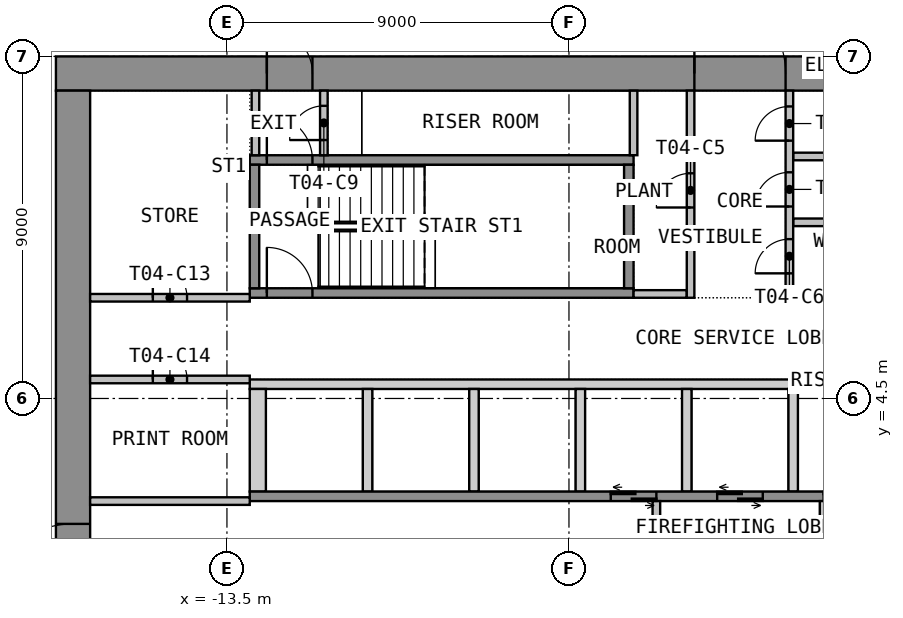
"""IFC4 building model, lengths in metres.
Left out: names, types, materials, properties, quantities, classifications, styles, units other than length and angle.
Written with IfcOpenShell. Run it as: python <this file> out.ifc"""

import sys

from ifc_helpers import new_model, si_unit, direction, frame, frame_2d, origin, place, context, subcontext, project, spatial, polyline, rectangle, outline, extrude, element, fill, save


model = new_model("IFC4")
c1 = context("Model", 3, precision=1e-05, world=origin(), true_north=direction((0.0, 1.0)))
c2 = subcontext(c1, "Body", "Model", "MODEL_VIEW")
j1 = project(units=[si_unit("LENGTHUNIT", "METRE"), si_unit("PLANEANGLEUNIT", "RADIAN")], contexts=[c1])
p1 = place(None, origin())
s1 = spatial("IfcSite", under=j1, at=p1, CompositionType="ELEMENT")
p2 = place(p1, origin())
s2 = spatial("IfcBuilding", under=s1, at=p2, CompositionType="ELEMENT")
p3 = place(p2, frame((0.0, 0.0, 65.1)))
s3 = spatial("IfcBuildingStorey", under=s2, at=p3, CompositionType="ELEMENT", Elevation=65.1)
p4 = place(p3, frame((-18.0, 13.05, 0.0), z_axis=(0.0, 0.0, 1.0), x_axis=(1.0, 0.0, 0.0)))
e1 = element("IfcWall", 1, at=p4, inside=s3, PredefinedType="SHEAR", context=c2, shape_type="SweptSolid", body=[
    extrude(rectangle(XDim=36.0, YDim=0.9, at=frame_2d((18.0, 0.0))), origin(), (0.0, 0.0, 1.0), 3.525),
])
p5 = place(p4, frame((16.8, 0.0, 0.0)))
e2 = element("IfcOpeningElement", 2, at=p5, cuts=e1, PredefinedType="OPENING", context=c2, shape_type="SweptSolid", body=[
    extrude(rectangle(XDim=2.4, YDim=2.1, at=frame_2d((1.2, 1.05))), frame((0.0, 0.46, 0.0), z_axis=(0.0, -1.0, 0.0), x_axis=(1.0, 0.0, 0.0)), (0.0, 0.0, 1.0), 0.92),
])
p6 = place(p4, frame((5.55, 0.0, 0.0)))
e3 = element("IfcOpeningElement", 3, at=p6, cuts=e1, PredefinedType="OPENING", context=c2, shape_type="SweptSolid", body=[
    extrude(rectangle(XDim=1.2, YDim=2.1, at=frame_2d((0.6, 1.05))), frame((0.0, 0.46, 0.0), z_axis=(0.0, -1.0, 0.0), x_axis=(1.0, 0.0, 0.0)), (0.0, 0.0, 1.0), 0.92),
])
p7 = place(p4, frame((29.25, 0.0, 0.0)))
e4 = element("IfcOpeningElement", 4, at=p7, cuts=e1, PredefinedType="OPENING", context=c2, shape_type="SweptSolid", body=[
    extrude(rectangle(XDim=1.2, YDim=2.1, at=frame_2d((0.6, 1.05))), frame((0.0, 0.46, 0.0), z_axis=(0.0, -1.0, 0.0), x_axis=(1.0, 0.0, 0.0)), (0.0, 0.0, 1.0), 0.92),
])
p8 = place(p3, frame((-17.55, -12.6, 0.0), z_axis=(0.0, 0.0, 1.0), x_axis=(0.0, 1.0, 0.0)))
e5 = element("IfcWall", 5, at=p8, inside=s3, PredefinedType="SHEAR", context=c2, shape_type="SweptSolid", body=[
    extrude(rectangle(XDim=25.2, YDim=0.9, at=frame_2d((12.6, 0.0))), origin(), (0.0, 0.0, 1.0), 3.525),
])
p9 = place(p8, frame((11.4, 0.0, 0.0)))
e6 = element("IfcOpeningElement", 6, at=p9, cuts=e5, PredefinedType="OPENING", context=c2, shape_type="SweptSolid", body=[
    extrude(rectangle(XDim=2.4, YDim=2.1, at=frame_2d((1.2, 1.05))), frame((0.0, 0.46, 0.0), z_axis=(0.0, -1.0, 0.0), x_axis=(1.0, 0.0, 0.0)), (0.0, 0.0, 1.0), 0.92),
])
p10 = place(p3, origin())
e7 = element("IfcWall", 7, at=p10, inside=s3, PredefinedType="SHEAR", context=c2, shape_type="SweptSolid", body=[
    extrude(outline(polyline([(-12.9, 4.75), (12.9, 4.75), (12.9, 5.0), (-12.9, 5.0), (-12.9, 4.75)])), origin(), (0.0, 0.0, 1.0), 3.525),
])
p11 = place(p3, origin())
e8 = element("IfcWall", 8, at=p11, inside=s3, PredefinedType="SHEAR", context=c2, shape_type="SweptSolid", body=[
    extrude(outline(polyline([(-12.9, 2.05), (-12.475, 2.05), (-12.475, 4.75), (-12.9, 4.75), (-12.9, 2.05)])), origin(), (0.0, 0.0, 1.0), 3.525),
])
p12 = place(p3, origin())
e9 = element("IfcWall", 9, at=p12, inside=s3, PredefinedType="SHEAR", context=c2, shape_type="SweptSolid", body=[
    extrude(outline(polyline([(-9.925, 2.05), (-9.675, 2.05), (-9.675, 4.75), (-9.925, 4.75), (-9.925, 2.05)])), origin(), (0.0, 0.0, 1.0), 3.525),
])
p13 = place(p3, origin())
e10 = element("IfcWall", 10, at=p13, inside=s3, PredefinedType="SHEAR", context=c2, shape_type="SweptSolid", body=[
    extrude(outline(polyline([(-7.125, 2.05), (-6.875, 2.05), (-6.875, 4.75), (-7.125, 4.75), (-7.125, 2.05)])), origin(), (0.0, 0.0, 1.0), 3.525),
])
p14 = place(p3, origin())
e11 = element("IfcWall", 11, at=p14, inside=s3, PredefinedType="SHEAR", context=c2, shape_type="SweptSolid", body=[
    extrude(outline(polyline([(-4.325, 2.05), (-4.075, 2.05), (-4.075, 4.75), (-4.325, 4.75), (-4.325, 2.05)])), origin(), (0.0, 0.0, 1.0), 3.525),
])
p15 = place(p3, origin())
e12 = element("IfcWall", 12, at=p15, inside=s3, PredefinedType="SHEAR", context=c2, shape_type="SweptSolid", body=[
    extrude(outline(polyline([(-1.525, 2.05), (-1.275, 2.05), (-1.275, 4.75), (-1.525, 4.75), (-1.525, 2.05)])), origin(), (0.0, 0.0, 1.0), 3.525),
])
p16 = place(p3, origin())
e13 = element("IfcWall", 13, at=p16, inside=s3, PredefinedType="SHEAR", context=c2, shape_type="SweptSolid", body=[
    extrude(outline(polyline([(1.275, 2.05), (1.525, 2.05), (1.525, 4.75), (1.275, 4.75), (1.275, 2.05)])), origin(), (0.0, 0.0, 1.0), 3.525),
])
p17 = place(p3, frame((-12.9, 1.925, 0.0), z_axis=(0.0, 0.0, 1.0), x_axis=(1.0, 0.0, 0.0)))
e14 = element("IfcWall", 14, at=p17, inside=s3, PredefinedType="SHEAR", context=c2, shape_type="SweptSolid", body=[
    extrude(rectangle(XDim=25.8, YDim=0.25, at=frame_2d((12.9, 0.0))), origin(), (0.0, 0.0, 1.0), 3.525),
])
p18 = place(p17, frame((9.5, 0.0, 0.0)))
e15 = element("IfcOpeningElement", 15, at=p18, cuts=e14, PredefinedType="OPENING", context=c2, shape_type="SweptSolid", body=[
    extrude(rectangle(XDim=1.2, YDim=2.1, at=frame_2d((0.6, 1.05))), frame((0.0, 0.135, 0.0), z_axis=(0.0, -1.0, 0.0), x_axis=(1.0, 0.0, 0.0)), (0.0, 0.0, 1.0), 0.27),
])
p19 = place(p17, frame((12.3, 0.0, 0.0)))
e16 = element("IfcOpeningElement", 16, at=p19, cuts=e14, PredefinedType="OPENING", context=c2, shape_type="SweptSolid", body=[
    extrude(rectangle(XDim=1.2, YDim=2.1, at=frame_2d((0.6, 1.05))), frame((0.0, 0.135, 0.0), z_axis=(0.0, -1.0, 0.0), x_axis=(1.0, 0.0, 0.0)), (0.0, 0.0, 1.0), 0.27),
])
p20 = place(p17, frame((15.1, 0.0, 0.0)))
e17 = element("IfcOpeningElement", 17, at=p20, cuts=e14, PredefinedType="OPENING", context=c2, shape_type="SweptSolid", body=[
    extrude(rectangle(XDim=1.2, YDim=2.1, at=frame_2d((0.6, 1.05))), frame((0.0, 0.135, 0.0), z_axis=(0.0, -1.0, 0.0), x_axis=(1.0, 0.0, 0.0)), (0.0, 0.0, 1.0), 0.27),
])
p21 = place(p17, frame((17.9, 0.0, 0.0)))
e18 = element("IfcOpeningElement", 18, at=p21, cuts=e14, PredefinedType="OPENING", context=c2, shape_type="SweptSolid", body=[
    extrude(rectangle(XDim=1.2, YDim=2.1, at=frame_2d((0.6, 1.05))), frame((0.0, 0.135, 0.0), z_axis=(0.0, -1.0, 0.0), x_axis=(1.0, 0.0, 0.0)), (0.0, 0.0, 1.0), 0.27),
])
p22 = place(p17, frame((20.7, 0.0, 0.0)))
e19 = element("IfcOpeningElement", 19, at=p22, cuts=e14, PredefinedType="OPENING", context=c2, shape_type="SweptSolid", body=[
    extrude(rectangle(XDim=1.2, YDim=2.1, at=frame_2d((0.6, 1.05))), frame((0.0, 0.135, 0.0), z_axis=(0.0, -1.0, 0.0), x_axis=(1.0, 0.0, 0.0)), (0.0, 0.0, 1.0), 0.27),
])
p23 = place(p17, frame((23.5, 0.0, 0.0)))
e20 = element("IfcOpeningElement", 20, at=p23, cuts=e14, PredefinedType="OPENING", context=c2, shape_type="SweptSolid", body=[
    extrude(rectangle(XDim=1.2, YDim=2.1, at=frame_2d((0.6, 1.05))), frame((0.0, 0.135, 0.0), z_axis=(0.0, -1.0, 0.0), x_axis=(1.0, 0.0, 0.0)), (0.0, 0.0, 1.0), 0.27),
])
p24 = place(p3, frame((-2.2, -1.8, 0.0), z_axis=(0.0, 0.0, 1.0), x_axis=(0.0, 1.0, 0.0)))
e21 = element("IfcWall", 21, at=p24, inside=s3, PredefinedType="PARTITIONING", context=c2, shape_type="SweptSolid", body=[
    extrude(rectangle(XDim=3.6, YDim=0.2, at=frame_2d((1.8, 0.0))), origin(), (0.0, 0.0, 1.0), 3.525),
])
p25 = place(p24, frame((1.2, 0.0, 0.0)))
e22 = element("IfcOpeningElement", 22, at=p25, cuts=e21, PredefinedType="OPENING", context=c2, shape_type="SweptSolid", body=[
    extrude(rectangle(XDim=1.2, YDim=2.1, at=frame_2d((0.6, 1.05))), frame((0.0, 0.11, 0.0), z_axis=(0.0, -1.0, 0.0), x_axis=(1.0, 0.0, 0.0)), (0.0, 0.0, 1.0), 0.22),
])
p26 = place(p3, frame((2.2, -1.8, 0.0), z_axis=(0.0, 0.0, 1.0), x_axis=(0.0, 1.0, 0.0)))
e23 = element("IfcWall", 23, at=p26, inside=s3, PredefinedType="PARTITIONING", context=c2, shape_type="SweptSolid", body=[
    extrude(rectangle(XDim=3.6, YDim=0.2, at=frame_2d((1.8, 0.0))), origin(), (0.0, 0.0, 1.0), 3.525),
])
p27 = place(p26, frame((1.2, 0.0, 0.0)))
e24 = element("IfcOpeningElement", 24, at=p27, cuts=e23, PredefinedType="OPENING", context=c2, shape_type="SweptSolid", body=[
    extrude(rectangle(XDim=1.2, YDim=2.1, at=frame_2d((0.6, 1.05))), frame((0.0, 0.11, 0.0), z_axis=(0.0, -1.0, 0.0), x_axis=(1.0, 0.0, 0.0)), (0.0, 0.0, 1.0), 0.22),
])
p28 = place(p3, frame((-12.9, 7.275, 0.0), z_axis=(0.0, 0.0, 1.0), x_axis=(1.0, 0.0, 0.0)))
e25 = element("IfcWall", 25, at=p28, inside=s3, PredefinedType="SHEAR", context=c2, shape_type="SweptSolid", body=[
    extrude(rectangle(XDim=10.1, YDim=0.25, at=frame_2d((5.05, 0.0))), origin(), (0.0, 0.0, 1.0), 3.525),
])
p29 = place(p28, frame((0.45, 0.0, 0.0)))
e26 = element("IfcOpeningElement", 26, at=p29, cuts=e25, PredefinedType="OPENING", context=c2, shape_type="SweptSolid", body=[
    extrude(rectangle(XDim=1.2, YDim=2.1, at=frame_2d((0.6, 1.05))), frame((0.0, 0.135, 0.0), z_axis=(0.0, -1.0, 0.0), x_axis=(1.0, 0.0, 0.0)), (0.0, 0.0, 1.0), 0.27),
])
p30 = place(p3, frame((-12.9, 10.775, 0.0), z_axis=(0.0, 0.0, 1.0), x_axis=(1.0, 0.0, 0.0)))
e27 = element("IfcWall", 27, at=p30, inside=s3, PredefinedType="SHEAR", context=c2, shape_type="SweptSolid", body=[
    extrude(rectangle(XDim=10.1, YDim=0.25, at=frame_2d((5.05, 0.0))), origin(), (0.0, 0.0, 1.0), 3.525),
])
p31 = place(p30, frame((0.45, 0.0, 0.0)))
e28 = element("IfcOpeningElement", 28, at=p31, cuts=e27, PredefinedType="OPENING", context=c2, shape_type="SweptSolid", body=[
    extrude(rectangle(XDim=1.2, YDim=2.1, at=frame_2d((0.6, 1.05))), frame((0.0, 0.135, 0.0), z_axis=(0.0, -1.0, 0.0), x_axis=(1.0, 0.0, 0.0)), (0.0, 0.0, 1.0), 0.27),
])
for number, where, z_axis, x_axis in (
    (29, (-12.775, 7.4, 0.0), (0.0, 0.0, 1.0), (0.0, 1.0, 0.0)),
    (30, (-2.925, 7.4, 0.0), (0.0, 0.0, 1.0), (0.0, 1.0, 0.0)),
):
    element("IfcWall", number, at=place(p3, frame(where, z_axis=z_axis, x_axis=x_axis)), inside=s3, PredefinedType="SHEAR", context=c2, shape_type="SweptSolid", body=[
        extrude(rectangle(XDim=3.25, YDim=0.25, at=frame_2d((1.625, 0.0))), origin(), (0.0, 0.0, 1.0), 3.525),
    ])
for number, where, z_axis, x_axis in (
    (31, (-2.8, 7.25, 0.0), (0.0, 0.0, 1.0), (1.0, 0.0, 0.0)),
    (32, (1.4, 7.25, 0.0), (0.0, 0.0, 1.0), (1.0, 0.0, 0.0)),
    (33, (1.4, 9.135, 0.0), (0.0, 0.0, 1.0), (1.0, 0.0, 0.0)),
    (34, (1.4, 10.867, 0.0), (0.0, 0.0, 1.0), (1.0, 0.0, 0.0)),
):
    element("IfcWall", number, at=place(p3, frame(where, z_axis=z_axis, x_axis=x_axis)), inside=s3, PredefinedType="PARTITIONING", context=c2, shape_type="SweptSolid", body=[
        extrude(rectangle(XDim=1.4, YDim=0.2, at=frame_2d((0.7, 0.0))), origin(), (0.0, 0.0, 1.0), 3.525),
    ])
p32 = place(p3, frame((-1.3, 7.15, 0.0), z_axis=(0.0, 0.0, 1.0), x_axis=(0.0, 1.0, 0.0)))
e35 = element("IfcWall", 35, at=p32, inside=s3, PredefinedType="PARTITIONING", context=c2, shape_type="SweptSolid", body=[
    extrude(rectangle(XDim=5.45, YDim=0.2, at=frame_2d((2.725, 0.0))), origin(), (0.0, 0.0, 1.0), 3.525),
])
p33 = place(p32, frame((2.375, 0.0, 0.0)))
e36 = element("IfcOpeningElement", 36, at=p33, cuts=e35, PredefinedType="OPENING", context=c2, shape_type="SweptSolid", body=[
    extrude(rectangle(XDim=0.9, YDim=2.1, at=frame_2d((0.45, 1.05))), frame((0.0, 0.11, 0.0), z_axis=(0.0, -1.0, 0.0), x_axis=(1.0, 0.0, 0.0)), (0.0, 0.0, 1.0), 0.22),
])
p34 = place(p3, frame((1.3, 7.15, 0.0), z_axis=(0.0, 0.0, 1.0), x_axis=(0.0, 1.0, 0.0)))
e37 = element("IfcWall", 37, at=p34, inside=s3, PredefinedType="PARTITIONING", context=c2, shape_type="SweptSolid", body=[
    extrude(rectangle(XDim=5.45, YDim=0.2, at=frame_2d((2.725, 0.0))), origin(), (0.0, 0.0, 1.0), 3.525),
])
p35 = place(p34, frame((0.643, 0.0, 0.0)))
e38 = element("IfcOpeningElement", 38, at=p35, cuts=e37, PredefinedType="OPENING", context=c2, shape_type="SweptSolid", body=[
    extrude(rectangle(XDim=0.9, YDim=2.1, at=frame_2d((0.45, 1.05))), frame((0.0, 0.11, 0.0), z_axis=(0.0, -1.0, 0.0), x_axis=(1.0, 0.0, 0.0)), (0.0, 0.0, 1.0), 0.22),
])
p36 = place(p34, frame((2.401, 0.0, 0.0)))
e39 = element("IfcOpeningElement", 39, at=p36, cuts=e37, PredefinedType="OPENING", context=c2, shape_type="SweptSolid", body=[
    extrude(rectangle(XDim=0.9, YDim=2.1, at=frame_2d((0.45, 1.05))), frame((0.0, 0.11, 0.0), z_axis=(0.0, -1.0, 0.0), x_axis=(1.0, 0.0, 0.0)), (0.0, 0.0, 1.0), 0.22),
])
p37 = place(p34, frame((4.134, 0.0, 0.0)))
e40 = element("IfcOpeningElement", 40, at=p37, cuts=e37, PredefinedType="OPENING", context=c2, shape_type="SweptSolid", body=[
    extrude(rectangle(XDim=0.9, YDim=2.1, at=frame_2d((0.45, 1.05))), frame((0.0, 0.11, 0.0), z_axis=(0.0, -1.0, 0.0), x_axis=(1.0, 0.0, 0.0)), (0.0, 0.0, 1.0), 0.22),
])
p38 = place(p3, frame((-12.75, 10.9, 0.0), z_axis=(0.0, 0.0, 1.0), x_axis=(0.0, 1.0, 0.0)))
e41 = element("IfcWall", 41, at=p38, inside=s3, PredefinedType="PARTITIONING", context=c2, shape_type="SweptSolid", body=[
    extrude(rectangle(XDim=1.7, YDim=0.2, at=frame_2d((0.85, 0.0))), origin(), (0.0, 0.0, 1.0), 3.525),
])
p39 = place(p3, frame((-10.95, 10.9, 0.0), z_axis=(0.0, 0.0, 1.0), x_axis=(0.0, 1.0, 0.0)))
e42 = element("IfcWall", 42, at=p39, inside=s3, PredefinedType="PARTITIONING", context=c2, shape_type="SweptSolid", body=[
    extrude(rectangle(XDim=1.7, YDim=0.2, at=frame_2d((0.85, 0.0))), origin(), (0.0, 0.0, 1.0), 3.525),
])
p40 = place(p39, frame((0.4, 0.0, 0.0)))
e43 = element("IfcOpeningElement", 43, at=p40, cuts=e42, PredefinedType="OPENING", context=c2, shape_type="SweptSolid", body=[
    extrude(rectangle(XDim=0.9, YDim=2.1, at=frame_2d((0.45, 1.05))), frame((0.0, 0.11, 0.0), z_axis=(0.0, -1.0, 0.0), x_axis=(1.0, 0.0, 0.0)), (0.0, 0.0, 1.0), 0.22),
])
p41 = place(p3, frame((-17.1, 7.15, 0.0), z_axis=(0.0, 0.0, 1.0), x_axis=(1.0, 0.0, 0.0)))
e44 = element("IfcWall", 44, at=p41, inside=s3, PredefinedType="PARTITIONING", context=c2, shape_type="SweptSolid", body=[
    extrude(rectangle(XDim=4.2, YDim=0.2, at=frame_2d((2.1, 0.0))), origin(), (0.0, 0.0, 1.0), 3.525),
])
p42 = place(p41, frame((1.65, 0.0, 0.0)))
e45 = element("IfcOpeningElement", 45, at=p42, cuts=e44, PredefinedType="OPENING", context=c2, shape_type="SweptSolid", body=[
    extrude(rectangle(XDim=0.9, YDim=2.1, at=frame_2d((0.45, 1.05))), frame((0.0, 0.11, 0.0), z_axis=(0.0, -1.0, 0.0), x_axis=(1.0, 0.0, 0.0)), (0.0, 0.0, 1.0), 0.22),
])
p43 = place(p3, frame((-17.1, 5.0, 0.0), z_axis=(0.0, 0.0, 1.0), x_axis=(1.0, 0.0, 0.0)))
e46 = element("IfcWall", 46, at=p43, inside=s3, PredefinedType="PARTITIONING", context=c2, shape_type="SweptSolid", body=[
    extrude(rectangle(XDim=4.2, YDim=0.2, at=frame_2d((2.1, 0.0))), origin(), (0.0, 0.0, 1.0), 3.525),
])
p44 = place(p43, frame((1.65, 0.0, 0.0)))
e47 = element("IfcOpeningElement", 47, at=p44, cuts=e46, PredefinedType="OPENING", context=c2, shape_type="SweptSolid", body=[
    extrude(rectangle(XDim=0.9, YDim=2.1, at=frame_2d((0.45, 1.05))), frame((0.0, 0.11, 0.0), z_axis=(0.0, -1.0, 0.0), x_axis=(1.0, 0.0, 0.0)), (0.0, 0.0, 1.0), 0.22),
])
p45 = place(p3, frame((-17.1, 1.8, 0.0), z_axis=(0.0, 0.0, 1.0), x_axis=(1.0, 0.0, 0.0)))
e48 = element("IfcWall", 48, at=p45, inside=s3, PredefinedType="PARTITIONING", context=c2, shape_type="SweptSolid", body=[
    extrude(rectangle(XDim=4.2, YDim=0.2, at=frame_2d((2.1, 0.0))), origin(), (0.0, 0.0, 1.0), 3.525),
])
p46 = place(p3, frame((-2.8, 10.901, 0.0), z_axis=(0.0, 0.0, 1.0), x_axis=(0.0, 1.0, 0.0)))
e49 = element("IfcWall", 49, at=p46, inside=s3, PredefinedType="PARTITIONING", context=c2, shape_type="SweptSolid", body=[
    extrude(rectangle(XDim=1.698, YDim=0.2, at=frame_2d((0.849, 0.0))), origin(), (0.0, 0.0, 1.0), 3.525),
])
p47 = place(p9, origin())
e50 = element("IfcDoor", 50, at=p47, inside=s3, OperationType="DOUBLE_DOOR_DOUBLE_SWING", PredefinedType="DOOR", context=c2, shape_type="SweptSolid", body=[
    extrude(rectangle(XDim=2.4, YDim=2.1, at=frame_2d((1.2, 1.05))), frame((0.0, 0.025, 0.0), z_axis=(0.0, -1.0, 0.0), x_axis=(1.0, 0.0, 0.0)), (0.0, 0.0, 1.0), 0.05),
])
fill(e6, e50)
p48 = place(p5, origin())
e51 = element("IfcDoor", 51, at=p48, inside=s3, OperationType="DOUBLE_DOOR_DOUBLE_SWING", PredefinedType="DOOR", context=c2, shape_type="SweptSolid", body=[
    extrude(rectangle(XDim=2.4, YDim=2.1, at=frame_2d((1.2, 1.05))), frame((0.0, 0.025, 0.0), z_axis=(0.0, -1.0, 0.0), x_axis=(1.0, 0.0, 0.0)), (0.0, 0.0, 1.0), 0.05),
])
fill(e2, e51)
p49 = place(p6, origin())
e52 = element("IfcDoor", 52, at=p49, inside=s3, OperationType="SINGLE_SWING_RIGHT", PredefinedType="DOOR", context=c2, shape_type="SweptSolid", body=[
    extrude(rectangle(XDim=1.2, YDim=2.1, at=frame_2d((0.6, 1.05))), frame((0.0, 0.025, 0.0), z_axis=(0.0, -1.0, 0.0), x_axis=(1.0, 0.0, 0.0)), (0.0, 0.0, 1.0), 0.05),
])
fill(e3, e52)
p50 = place(p18, origin())
e53 = element("IfcDoor", 53, at=p50, inside=s3, OperationType="DOUBLE_DOOR_SLIDING", PredefinedType="DOOR", context=c2, shape_type="SweptSolid", body=[
    extrude(rectangle(XDim=1.2, YDim=2.1, at=frame_2d((0.6, 1.05))), frame((0.0, 0.025, 0.0), z_axis=(0.0, -1.0, 0.0), x_axis=(1.0, 0.0, 0.0)), (0.0, 0.0, 1.0), 0.05),
])
fill(e15, e53)
p51 = place(p19, origin())
e54 = element("IfcDoor", 54, at=p51, inside=s3, OperationType="DOUBLE_DOOR_SLIDING", PredefinedType="DOOR", context=c2, shape_type="SweptSolid", body=[
    extrude(rectangle(XDim=1.2, YDim=2.1, at=frame_2d((0.6, 1.05))), frame((0.0, 0.025, 0.0), z_axis=(0.0, -1.0, 0.0), x_axis=(1.0, 0.0, 0.0)), (0.0, 0.0, 1.0), 0.05),
])
fill(e16, e54)
p52 = place(p29, origin())
e55 = element("IfcDoor", 55, at=p52, inside=s3, OperationType="SINGLE_SWING_LEFT", PredefinedType="DOOR", context=c2, shape_type="SweptSolid", body=[
    extrude(rectangle(XDim=1.2, YDim=2.1, at=frame_2d((0.6, 1.05))), frame((0.0, 0.025, 0.0), z_axis=(0.0, -1.0, 0.0), x_axis=(1.0, 0.0, 0.0)), (0.0, 0.0, 1.0), 0.05),
])
fill(e26, e55)
p53 = place(p33, origin())
e56 = element("IfcDoor", 56, at=p53, inside=s3, OperationType="SINGLE_SWING_LEFT", PredefinedType="DOOR", context=c2, shape_type="SweptSolid", body=[
    extrude(rectangle(XDim=0.9, YDim=2.1, at=frame_2d((0.45, 1.05))), frame((0.0, 0.025, 0.0), z_axis=(0.0, -1.0, 0.0), x_axis=(1.0, 0.0, 0.0)), (0.0, 0.0, 1.0), 0.05),
])
fill(e36, e56)
p54 = place(p35, origin())
e57 = element("IfcDoor", 57, at=p54, inside=s3, OperationType="SINGLE_SWING_LEFT", PredefinedType="DOOR", context=c2, shape_type="SweptSolid", body=[
    extrude(rectangle(XDim=0.9, YDim=2.1, at=frame_2d((0.45, 1.05))), frame((0.0, 0.025, 0.0), z_axis=(0.0, -1.0, 0.0), x_axis=(1.0, 0.0, 0.0)), (0.0, 0.0, 1.0), 0.05),
])
fill(e38, e57)
p55 = place(p36, origin())
e58 = element("IfcDoor", 58, at=p55, inside=s3, OperationType="SINGLE_SWING_LEFT", PredefinedType="DOOR", context=c2, shape_type="SweptSolid", body=[
    extrude(rectangle(XDim=0.9, YDim=2.1, at=frame_2d((0.45, 1.05))), frame((0.0, 0.025, 0.0), z_axis=(0.0, -1.0, 0.0), x_axis=(1.0, 0.0, 0.0)), (0.0, 0.0, 1.0), 0.05),
])
fill(e39, e58)
p56 = place(p37, origin())
e59 = element("IfcDoor", 59, at=p56, inside=s3, OperationType="SINGLE_SWING_LEFT", PredefinedType="DOOR", context=c2, shape_type="SweptSolid", body=[
    extrude(rectangle(XDim=0.9, YDim=2.1, at=frame_2d((0.45, 1.05))), frame((0.0, 0.025, 0.0), z_axis=(0.0, -1.0, 0.0), x_axis=(1.0, 0.0, 0.0)), (0.0, 0.0, 1.0), 0.05),
])
fill(e40, e59)
p57 = place(p31, origin())
e60 = element("IfcDoor", 60, at=p57, inside=s3, OperationType="SINGLE_SWING_RIGHT", PredefinedType="DOOR", context=c2, shape_type="SweptSolid", body=[
    extrude(rectangle(XDim=1.2, YDim=2.1, at=frame_2d((0.6, 1.05))), frame((0.0, 0.025, 0.0), z_axis=(0.0, -1.0, 0.0), x_axis=(1.0, 0.0, 0.0)), (0.0, 0.0, 1.0), 0.05),
])
fill(e28, e60)
p58 = place(p40, origin())
e61 = element("IfcDoor", 61, at=p58, inside=s3, OperationType="SINGLE_SWING_LEFT", PredefinedType="DOOR", context=c2, shape_type="SweptSolid", body=[
    extrude(rectangle(XDim=0.9, YDim=2.1, at=frame_2d((0.45, 1.05))), frame((0.0, 0.025, 0.0), z_axis=(0.0, -1.0, 0.0), x_axis=(1.0, 0.0, 0.0)), (0.0, 0.0, 1.0), 0.05),
])
fill(e43, e61)
p59 = place(p42, origin())
e62 = element("IfcDoor", 62, at=p59, inside=s3, OperationType="SINGLE_SWING_LEFT", PredefinedType="DOOR", context=c2, shape_type="SweptSolid", body=[
    extrude(rectangle(XDim=0.9, YDim=2.1, at=frame_2d((0.45, 1.05))), frame((0.0, 0.025, 0.0), z_axis=(0.0, -1.0, 0.0), x_axis=(1.0, 0.0, 0.0)), (0.0, 0.0, 1.0), 0.05),
])
fill(e45, e62)
p60 = place(p44, origin())
e63 = element("IfcDoor", 63, at=p60, inside=s3, OperationType="SINGLE_SWING_LEFT", PredefinedType="DOOR", context=c2, shape_type="SweptSolid", body=[
    extrude(rectangle(XDim=0.9, YDim=2.1, at=frame_2d((0.45, 1.05))), frame((0.0, 0.025, 0.0), z_axis=(0.0, -1.0, 0.0), x_axis=(1.0, 0.0, 0.0)), (0.0, 0.0, 1.0), 0.05),
])
fill(e47, e63)
save(model, sys.argv[1])
